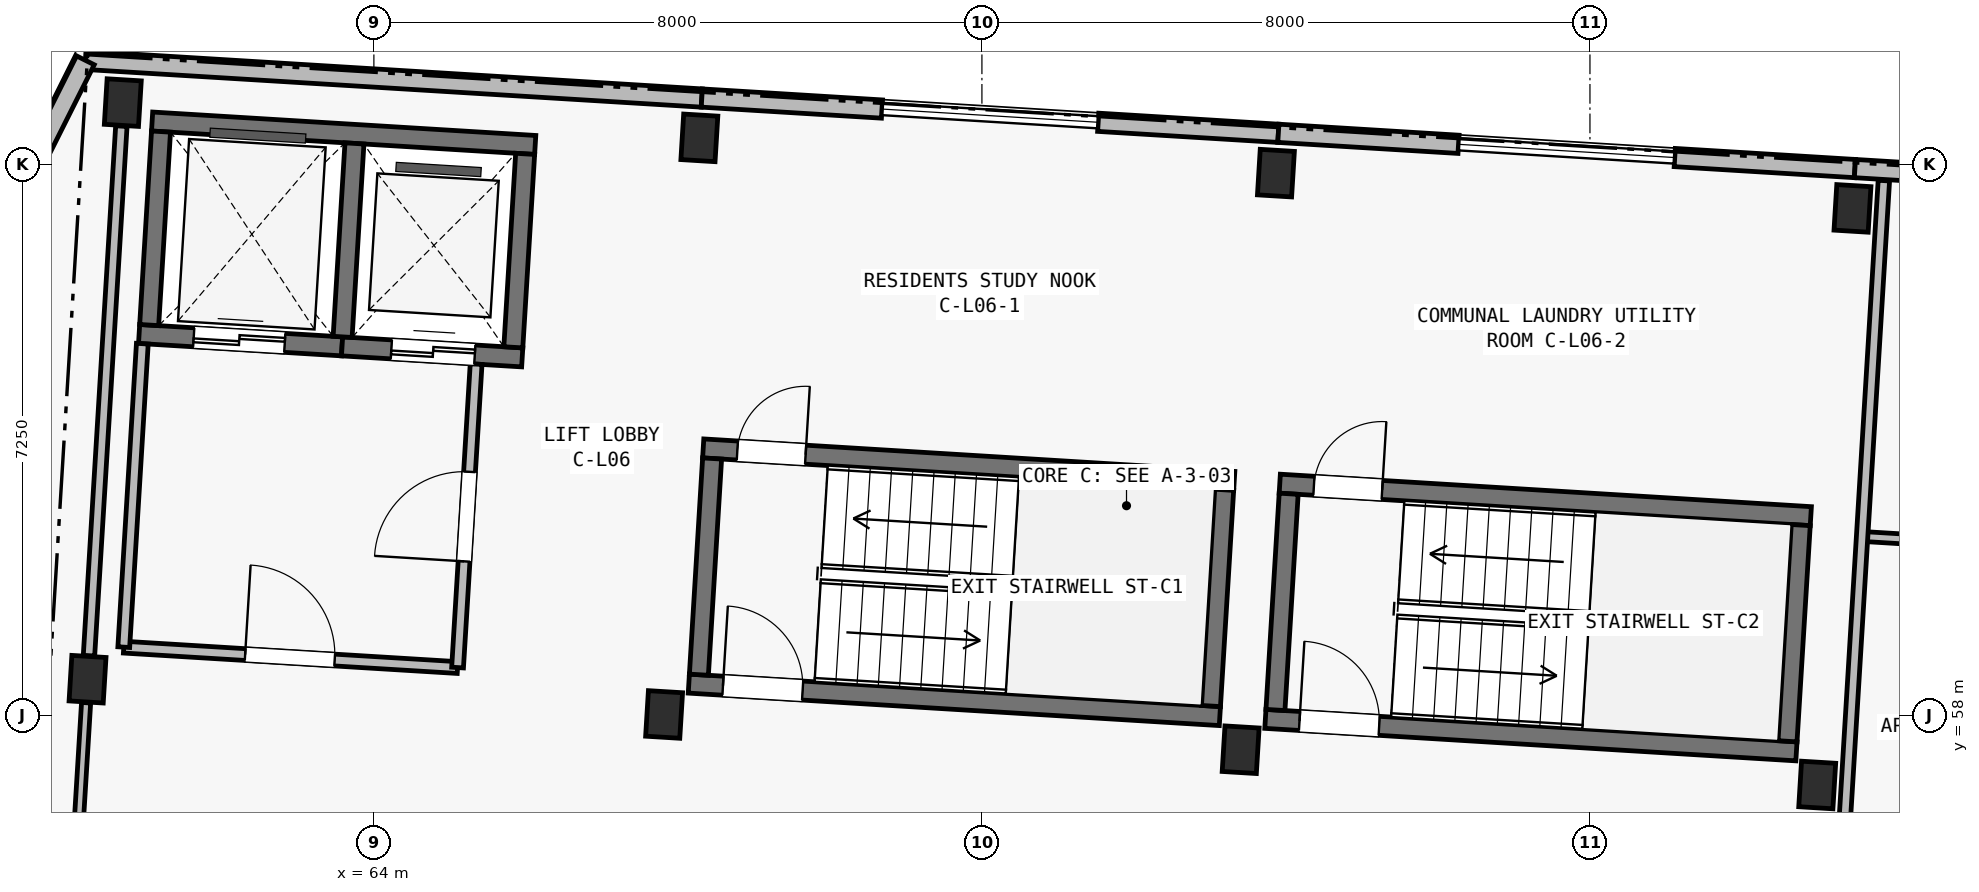
"""IFC4 building model, lengths in metres.
Left out: names, types, materials, properties, quantities, classifications, styles, units other than length and angle.
Written with IfcOpenShell. Run it as: python <this file> out.ifc"""

import sys

from ifc_helpers import new_model, si_unit, direction, frame, frame_2d, origin, origin_2d, place, context, subcontext, project, spatial, rectangle, extrude, element, fill, save


model = new_model("IFC4")
c1 = context("Model", 3, precision=1e-05, world=origin(), true_north=direction((0.0, 1.0)))
c2 = subcontext(c1, "Body", "Model", "MODEL_VIEW")
j1 = project(units=[si_unit("LENGTHUNIT", "METRE"), si_unit("PLANEANGLEUNIT", "RADIAN")], contexts=[c1])
p1 = place(None, origin())
s1 = spatial("IfcSite", under=j1, at=p1, CompositionType="ELEMENT")
p2 = place(p1, origin())
s2 = spatial("IfcBuilding", under=s1, at=p2, CompositionType="ELEMENT")
p3 = place(p2, frame((0.0, 0.0, 21.4)))
s3 = spatial("IfcBuildingStorey", under=s2, at=p3, CompositionType="ELEMENT", Elevation=21.4)
for number, where, z_axis, x_axis in (
    (1, (60.233, 58.478, 0.0), (0.0, 0.0, 1.0), (0.998, -0.061, 0.0)),
    (2, (60.697, 66.063, 0.0), (0.0, 0.0, 1.0), (0.998, -0.061, 0.0)),
    (3, (67.818, 58.014, 0.0), (0.0, 0.0, 1.0), (0.998, -0.061, 0.0)),
    (4, (68.282, 65.599, 0.0), (0.0, 0.0, 1.0), (0.998, -0.061, 0.0)),
    (5, (75.404, 57.55, 0.0), (0.0, 0.0, 1.0), (0.998, -0.061, 0.0)),
    (6, (75.868, 65.135, 0.0), (0.0, 0.0, 1.0), (0.998, -0.061, 0.0)),
    (7, (82.99, 57.086, 0.0), (0.0, 0.0, 1.0), (0.998, -0.061, 0.0)),
    (8, (83.454, 64.672, 0.0), (0.0, 0.0, 1.0), (0.998, -0.061, 0.0)),
):
    element("IfcColumn", number, at=place(p3, frame(where, z_axis=z_axis, x_axis=x_axis)), inside=s3, PredefinedType="COLUMN", context=c2, shape_type="SweptSolid", body=[
        extrude(rectangle(XDim=0.45, YDim=0.6, at=origin_2d()), origin(), (0.0, 0.0, 1.0), 3.25),
    ])
p4 = place(p3, frame((61.082, 65.814, 0.0), z_axis=(0.0, 0.0, 1.0), x_axis=(0.998134101522, -0.061059932685, 0.0)))
e9 = element("IfcWall", 9, at=p4, inside=s3, PredefinedType="SHEAR", context=c2, shape_type="SweptSolid", body=[
    extrude(rectangle(XDim=5.05, YDim=0.25, at=frame_2d((2.525, 0.0))), origin(), (0.0, 0.0, 1.0), 3.25),
])
p5 = place(p3, frame((60.911, 63.02, 0.0), z_axis=(0.0, 0.0, 1.0), x_axis=(0.998134099905, -0.061059959111, 0.0)))
e10 = element("IfcWall", 10, at=p5, inside=s3, PredefinedType="SHEAR", context=c2, shape_type="SweptSolid", body=[
    extrude(rectangle(XDim=2.675, YDim=0.25, at=frame_2d((1.337, 0.0))), origin(), (0.0, 0.0, 1.0), 3.25),
])
p6 = place(p5, frame((0.72, 0.0, 0.0)))
e11 = element("IfcOpeningElement", 11, at=p6, cuts=e10, PredefinedType="OPENING", context=c2, shape_type="SweptSolid", body=[
    extrude(rectangle(XDim=1.2, YDim=2.2, at=frame_2d((0.6, 1.1))), frame((0.0, 0.14, 0.0), z_axis=(0.0, -1.0, 0.0), x_axis=(1.0, 0.0, 0.0)), (0.0, 0.0, 1.0), 0.28),
])
p7 = place(p3, frame((63.581, 62.856, 0.0), z_axis=(0.0, 0.0, 1.0), x_axis=(0.998134103342, -0.061059902923, 0.0)))
e12 = element("IfcWall", 12, at=p7, inside=s3, PredefinedType="SHEAR", context=c2, shape_type="SweptSolid", body=[
    extrude(rectangle(XDim=2.375, YDim=0.25, at=frame_2d((1.188, 0.0))), origin(), (0.0, 0.0, 1.0), 3.25),
])
p8 = place(p7, frame((0.65, 0.0, 0.0)))
e13 = element("IfcOpeningElement", 13, at=p8, cuts=e12, PredefinedType="OPENING", context=c2, shape_type="SweptSolid", body=[
    extrude(rectangle(XDim=1.1, YDim=2.15, at=frame_2d((0.55, 1.075))), frame((0.0, 0.14, 0.0), z_axis=(0.0, -1.0, 0.0), x_axis=(1.0, 0.0, 0.0)), (0.0, 0.0, 1.0), 0.28),
])
p9 = place(p3, frame((61.043, 63.137, 0.0), z_axis=(0.0, 0.0, 1.0), x_axis=(0.061078919587, 0.998132939834, 0.0)))
e14 = element("IfcWall", 14, at=p9, inside=s3, PredefinedType="SHEAR", context=c2, shape_type="SweptSolid", body=[
    extrude(rectangle(XDim=2.55, YDim=0.25, at=frame_2d((1.275, 0.0))), origin(), (0.0, 0.0, 1.0), 3.25),
])
p10 = place(p3, frame((63.589, 62.981, 0.0), z_axis=(0.0, 0.0, 1.0), x_axis=(0.060989368901, 0.998138415692, 0.0)))
e15 = element("IfcWall", 15, at=p10, inside=s3, PredefinedType="SHEAR", context=c2, shape_type="SweptSolid", body=[
    extrude(rectangle(XDim=2.55, YDim=0.25, at=frame_2d((1.275, 0.0))), origin(), (0.0, 0.0, 1.0), 3.25),
])
p11 = place(p3, frame((65.834, 62.844, 0.0), z_axis=(0.0, 0.0, 1.0), x_axis=(0.061084756616, 0.998132582631, 0.0)))
e16 = element("IfcWall", 16, at=p11, inside=s3, PredefinedType="SHEAR", context=c2, shape_type="SweptSolid", body=[
    extrude(rectangle(XDim=2.55, YDim=0.25, at=frame_2d((1.275, 0.0))), origin(), (0.0, 0.0, 1.0), 3.25),
])
p12 = place(p3, frame((68.333, 61.514, 0.0), z_axis=(0.0, 0.0, 1.0), x_axis=(0.998135676081, -0.061034188237, 0.0)))
e17 = element("IfcWall", 17, at=p12, inside=s3, PredefinedType="SHEAR", context=c2, shape_type="SweptSolid", body=[
    extrude(rectangle(XDim=7.0, YDim=0.25, at=frame_2d((3.5, 0.0))), origin(), (0.0, 0.0, 1.0), 3.25),
])
p13 = place(p12, frame((0.45, 0.0, 0.0)))
e18 = element("IfcOpeningElement", 18, at=p13, cuts=e17, PredefinedType="OPENING", context=c2, shape_type="SweptSolid", body=[
    extrude(rectangle(XDim=0.9, YDim=2.1, at=frame_2d((0.45, 1.05))), frame((0.0, 0.14, 0.0), z_axis=(0.0, -1.0, 0.0), x_axis=(1.0, 0.0, 0.0)), (0.0, 0.0, 1.0), 0.28),
])
p14 = place(p3, frame((68.144, 58.419, 0.0), z_axis=(0.0, 0.0, 1.0), x_axis=(0.998135546153, -0.061036313012, 0.0)))
e19 = element("IfcWall", 19, at=p14, inside=s3, PredefinedType="SHEAR", context=c2, shape_type="SweptSolid", body=[
    extrude(rectangle(XDim=7.0, YDim=0.25, at=frame_2d((3.5, 0.0))), origin(), (0.0, 0.0, 1.0), 3.25),
])
p15 = place(p14, frame((0.45, 0.0, 0.0)))
e20 = element("IfcOpeningElement", 20, at=p15, cuts=e19, PredefinedType="OPENING", context=c2, shape_type="SweptSolid", body=[
    extrude(rectangle(XDim=1.05, YDim=2.15, at=frame_2d((0.525, 1.075))), frame((0.0, 0.14, 0.0), z_axis=(0.0, -1.0, 0.0), x_axis=(1.0, 0.0, 0.0)), (0.0, 0.0, 1.0), 0.28),
])
for number, where, z_axis, x_axis in (
    (21, (68.276, 58.537, 0.0), (0.0, 0.0, 1.0), (0.061, 0.998, 0.0)),
    (22, (75.014, 58.125, 0.0), (0.0, 0.0, 1.0), (0.061, 0.998, 0.0)),
):
    element("IfcWall", number, at=place(p3, frame(where, z_axis=z_axis, x_axis=x_axis)), inside=s3, PredefinedType="SHEAR", context=c2, shape_type="SweptSolid", body=[
        extrude(rectangle(XDim=2.85, YDim=0.25, at=frame_2d((1.425, 0.0))), origin(), (0.0, 0.0, 1.0), 3.25),
    ])
p16 = place(p3, frame((75.919, 61.05, 0.0), z_axis=(0.0, 0.0, 1.0), x_axis=(0.998135546153, -0.061036313012, 0.0)))
e23 = element("IfcWall", 23, at=p16, inside=s3, PredefinedType="SHEAR", context=c2, shape_type="SweptSolid", body=[
    extrude(rectangle(XDim=7.0, YDim=0.25, at=frame_2d((3.5, 0.0))), origin(), (0.0, 0.0, 1.0), 3.25),
])
p17 = place(p16, frame((0.45, 0.0, 0.0)))
e24 = element("IfcOpeningElement", 24, at=p17, cuts=e23, PredefinedType="OPENING", context=c2, shape_type="SweptSolid", body=[
    extrude(rectangle(XDim=0.9, YDim=2.1, at=frame_2d((0.45, 1.05))), frame((0.0, 0.14, 0.0), z_axis=(0.0, -1.0, 0.0), x_axis=(1.0, 0.0, 0.0)), (0.0, 0.0, 1.0), 0.28),
])
p18 = place(p3, frame((75.73, 57.956, 0.0), z_axis=(0.0, 0.0, 1.0), x_axis=(0.998135546153, -0.061036313012, 0.0)))
e25 = element("IfcWall", 25, at=p18, inside=s3, PredefinedType="SHEAR", context=c2, shape_type="SweptSolid", body=[
    extrude(rectangle(XDim=7.0, YDim=0.25, at=frame_2d((3.5, 0.0))), origin(), (0.0, 0.0, 1.0), 3.25),
])
p19 = place(p18, frame((0.45, 0.0, 0.0)))
e26 = element("IfcOpeningElement", 26, at=p19, cuts=e25, PredefinedType="OPENING", context=c2, shape_type="SweptSolid", body=[
    extrude(rectangle(XDim=1.05, YDim=2.15, at=frame_2d((0.525, 1.075))), frame((0.0, 0.14, 0.0), z_axis=(0.0, -1.0, 0.0), x_axis=(1.0, 0.0, 0.0)), (0.0, 0.0, 1.0), 0.28),
])
for number, where, z_axis, x_axis in (
    (27, (75.862, 58.073, 0.0), (0.0, 0.0, 1.0), (0.061, 0.998, 0.0)),
    (28, (82.599, 57.661, 0.0), (0.0, 0.0, 1.0), (0.061, 0.998, 0.0)),
):
    element("IfcWall", number, at=place(p3, frame(where, z_axis=z_axis, x_axis=x_axis)), inside=s3, PredefinedType="SHEAR", context=c2, shape_type="SweptSolid", body=[
        extrude(rectangle(XDim=2.85, YDim=0.25, at=frame_2d((1.425, 0.0))), origin(), (0.0, 0.0, 1.0), 3.25),
    ])
p20 = place(p3, frame((60.205, 66.62, 0.0), z_axis=(0.0, 0.0, 1.0), x_axis=(0.998134248939, -0.061057522844, 0.0)))
e29 = element("IfcWall", 29, at=p20, inside=s3, PredefinedType="SOLIDWALL", context=c2, shape_type="SweptSolid", body=[
    extrude(rectangle(XDim=8.125, YDim=0.24, at=frame_2d((4.062, 0.0))), origin(), (0.0, 0.0, 1.0), 3.0),
])
p21 = place(p3, frame((68.314, 66.124, 0.0), z_axis=(0.0, 0.0, 1.0), x_axis=(0.998134103342, -0.061059902923, 0.0)))
e30 = element("IfcWall", 30, at=p21, inside=s3, PredefinedType="SOLIDWALL", context=c2, shape_type="SweptSolid", body=[
    extrude(rectangle(XDim=2.375, YDim=0.24, at=frame_2d((1.188, 0.0))), origin(), (0.0, 0.0, 1.0), 3.0),
])
p22 = place(p3, frame((73.53, 65.804, 0.0), z_axis=(0.0, 0.0, 1.0), x_axis=(0.998133720034, -0.061066168473, 0.0)))
e31 = element("IfcWall", 31, at=p22, inside=s3, PredefinedType="SOLIDWALL", context=c2, shape_type="SweptSolid", body=[
    extrude(rectangle(XDim=2.375, YDim=0.24, at=frame_2d((1.188, 0.0))), origin(), (0.0, 0.0, 1.0), 3.0),
])
for number, where, z_axis, x_axis in (
    (32, (75.9, 65.659, 0.0), (0.0, 0.0, 1.0), (0.998, -0.061, 0.0)),
    (33, (81.115, 65.341, 0.0), (0.0, 0.0, 1.0), (0.998, -0.061, 0.0)),
):
    element("IfcWall", number, at=place(p3, frame(where, z_axis=z_axis, x_axis=x_axis)), inside=s3, PredefinedType="SOLIDWALL", context=c2, shape_type="SweptSolid", body=[
        extrude(rectangle(XDim=2.375, YDim=0.24, at=frame_2d((1.188, 0.0))), origin(), (0.0, 0.0, 1.0), 3.0),
    ])
p23 = place(p3, frame((83.486, 65.196, 0.0), z_axis=(0.0, 0.0, 1.0), x_axis=(0.998135669243, -0.061034300063, 0.0)))
e34 = element("IfcWall", 34, at=p23, inside=s3, PredefinedType="SOLIDWALL", context=c2, shape_type="SweptSolid", body=[
    extrude(rectangle(XDim=7.6, YDim=0.24, at=frame_2d((3.8, 0.0))), origin(), (0.0, 0.0, 1.0), 3.0),
])
p24 = place(p23, frame((0.89, 0.0, 0.5)))
e35 = element("IfcOpeningElement", 35, at=p24, cuts=e34, PredefinedType="OPENING", context=c2, shape_type="SweptSolid", body=[
    extrude(rectangle(XDim=0.84, YDim=2.28, at=frame_2d((0.42, 1.14))), frame((0.0, 0.135, 0.0), z_axis=(0.0, -1.0, 0.0), x_axis=(1.0, 0.0, 0.0)), (0.0, 0.0, 1.0), 0.27),
])
p25 = place(p23, frame((5.546, 0.0, 0.44)))
e36 = element("IfcOpeningElement", 36, at=p25, cuts=e34, PredefinedType="OPENING", context=c2, shape_type="SweptSolid", body=[
    extrude(rectangle(XDim=0.62, YDim=2.28, at=frame_2d((0.31, 1.14))), frame((0.0, 0.135, 0.0), z_axis=(0.0, -1.0, 0.0), x_axis=(1.0, 0.0, 0.0)), (0.0, 0.0, 1.0), 0.27),
])
p26 = place(p3, frame((51.654, 49.585, 0.0), z_axis=(0.0, 0.0, 1.0), x_axis=(0.448621989068, 0.893721607059, 0.0)))
e37 = element("IfcWall", 37, at=p26, inside=s3, PredefinedType="SOLIDWALL", context=c2, shape_type="SweptSolid", body=[
    extrude(rectangle(XDim=19.061, YDim=0.26, at=frame_2d((9.53, 0.0))), origin(), (0.0, 0.0, 1.0), 3.0),
])
p27 = place(p26, frame((2.81, 0.0, 0.45)))
e38 = element("IfcOpeningElement", 38, at=p27, cuts=e37, PredefinedType="OPENING", context=c2, shape_type="SweptSolid", body=[
    extrude(rectangle(XDim=0.58, YDim=2.16, at=frame_2d((0.29, 1.08))), frame((0.0, 0.145, 0.0), z_axis=(0.0, -1.0, 0.0), x_axis=(1.0, 0.0, 0.0)), (0.0, 0.0, 1.0), 0.29),
])
p28 = place(p26, frame((15.531, 0.0, 0.52)))
e39 = element("IfcOpeningElement", 39, at=p28, cuts=e37, PredefinedType="OPENING", context=c2, shape_type="SweptSolid", body=[
    extrude(rectangle(XDim=0.72, YDim=2.16, at=frame_2d((0.36, 1.08))), frame((0.0, 0.145, 0.0), z_axis=(0.0, -1.0, 0.0), x_axis=(1.0, 0.0, 0.0)), (0.0, 0.0, 1.0), 0.29),
])
p29 = place(p3, frame((60.709, 58.899, 0.0), z_axis=(0.0, 0.0, 1.0), x_axis=(0.998132276607, -0.061089756882, 0.0)))
e40 = element("IfcWall", 40, at=p29, inside=s3, PredefinedType="PARTITIONING", context=c2, shape_type="SweptSolid", body=[
    extrude(rectangle(XDim=4.4, YDim=0.155, at=frame_2d((2.2, 0.0))), origin(), (0.0, 0.0, 1.0), 2.97),
])
p30 = place(p29, frame((1.6, 0.0, 0.0)))
e41 = element("IfcOpeningElement", 41, at=p30, cuts=e40, PredefinedType="OPENING", context=c2, shape_type="SweptSolid", body=[
    extrude(rectangle(XDim=1.18, YDim=2.15, at=frame_2d((0.59, 1.075))), frame((0.0, 0.093, 0.0), z_axis=(0.0, -1.0, 0.0), x_axis=(1.0, 0.0, 0.0)), (0.0, 0.0, 1.0), 0.185),
])
p31 = place(p3, frame((60.709, 58.899, 0.0), z_axis=(0.0, 0.0, 1.0), x_axis=(0.061036844229, 0.998135513669, 0.0)))
e42 = element("IfcWall", 42, at=p31, inside=s3, PredefinedType="PARTITIONING", context=c2, shape_type="SweptSolid", body=[
    extrude(rectangle(XDim=4.0, YDim=0.155, at=frame_2d((2.0, 0.0))), origin(), (0.0, 0.0, 1.0), 2.97),
])
p32 = place(p3, frame((65.101, 58.631, 0.0), z_axis=(0.0, 0.0, 1.0), x_axis=(0.061033125904, 0.99813574104, 0.0)))
e43 = element("IfcWall", 43, at=p32, inside=s3, PredefinedType="PARTITIONING", context=c2, shape_type="SweptSolid", body=[
    extrude(rectangle(XDim=4.0, YDim=0.155, at=frame_2d((2.0, 0.0))), origin(), (0.0, 0.0, 1.0), 2.97),
])
p33 = place(p32, frame((1.4, 0.0, 0.0)))
e44 = element("IfcOpeningElement", 44, at=p33, cuts=e43, PredefinedType="OPENING", context=c2, shape_type="SweptSolid", body=[
    extrude(rectangle(XDim=1.18, YDim=2.15, at=frame_2d((0.59, 1.075))), frame((0.0, 0.093, 0.0), z_axis=(0.0, -1.0, 0.0), x_axis=(1.0, 0.0, 0.0)), (0.0, 0.0, 1.0), 0.185),
])
p34 = place(p3, frame((59.983, 54.395, 0.0), z_axis=(0.0, 0.0, 1.0), x_axis=(0.061035211258, 0.998135613525, 0.0)))
e45 = element("IfcWall", 45, at=p34, inside=s3, PredefinedType="PARTITIONING", context=c2, shape_type="SweptSolid", body=[
    extrude(rectangle(XDim=3.78, YDim=0.12, at=frame_2d((1.89, 0.0))), origin(), (0.0, 0.0, 1.0), 2.5),
])
p35 = place(p34, frame((1.35, 0.0, 0.0)))
e46 = element("IfcOpeningElement", 46, at=p35, cuts=e45, PredefinedType="OPENING", context=c2, shape_type="SweptSolid", body=[
    extrude(rectangle(XDim=0.9, YDim=2.1, at=frame_2d((0.45, 1.05))), frame((0.0, 0.075, 0.0), z_axis=(0.0, -1.0, 0.0), x_axis=(1.0, 0.0, 0.0)), (0.0, 0.0, 1.0), 0.15),
])
p36 = place(p3, frame((60.251, 58.787, 0.0), z_axis=(0.0, 0.0, 1.0), x_axis=(0.061071659957, 0.998133384047, 0.0)))
e47 = element("IfcWall", 47, at=p36, inside=s3, PredefinedType="PARTITIONING", context=c2, shape_type="SweptSolid", body=[
    extrude(rectangle(XDim=6.98, YDim=0.15, at=frame_2d((3.49, 0.0))), origin(), (0.0, 0.0, 1.0), 2.5),
])
p37 = place(p3, frame((83.581, 60.356, 0.0), z_axis=(0.0, 0.0, 1.0), x_axis=(0.998133350094, -0.061072214879, 0.0)))
e48 = element("IfcWall", 48, at=p37, inside=s3, PredefinedType="PARTITIONING", context=c2, shape_type="SweptSolid", body=[
    extrude(rectangle(XDim=3.41, YDim=0.13, at=frame_2d((1.705, 0.0))), origin(), (0.0, 0.0, 1.0), 2.97),
])
p38 = place(p37, frame((1.255, 0.0, 0.0)))
e49 = element("IfcOpeningElement", 49, at=p38, cuts=e48, PredefinedType="OPENING", context=c2, shape_type="SweptSolid", body=[
    extrude(rectangle(XDim=0.88, YDim=2.1, at=frame_2d((0.44, 1.05))), frame((0.0, 0.08, 0.0), z_axis=(0.0, -1.0, 0.0), x_axis=(1.0, 0.0, 0.0)), (0.0, 0.0, 1.0), 0.16),
])
p39 = place(p3, frame((83.265, 55.185, 0.0), z_axis=(0.0, 0.0, 1.0), x_axis=(0.061046193261, 0.998134941923, 0.0)))
e50 = element("IfcWall", 50, at=p39, inside=s3, PredefinedType="PARTITIONING", context=c2, shape_type="SweptSolid", body=[
    extrude(rectangle(XDim=9.87, YDim=0.15, at=frame_2d((4.935, 0.0))), origin(), (0.0, 0.0, 1.0), 2.97),
])
p40 = place(p30, origin())
e51 = element("IfcDoor", 51, at=p40, inside=s3, OperationType="SINGLE_SWING_LEFT", PredefinedType="DOOR", context=c2, shape_type="SweptSolid", body=[
    extrude(rectangle(XDim=1.18, YDim=2.15, at=frame_2d((0.59, 1.075))), frame((0.0, 0.025, 0.0), z_axis=(0.0, -1.0, 0.0), x_axis=(1.0, 0.0, 0.0)), (0.0, 0.0, 1.0), 0.05),
])
fill(e41, e51)
p41 = place(p33, origin())
e52 = element("IfcDoor", 52, at=p41, inside=s3, OperationType="SINGLE_SWING_LEFT", PredefinedType="DOOR", context=c2, shape_type="SweptSolid", body=[
    extrude(rectangle(XDim=1.18, YDim=2.15, at=frame_2d((0.59, 1.075))), frame((0.0, 0.025, 0.0), z_axis=(0.0, -1.0, 0.0), x_axis=(1.0, 0.0, 0.0)), (0.0, 0.0, 1.0), 0.05),
])
fill(e44, e52)
p42 = place(p15, origin())
e53 = element("IfcDoor", 53, at=p42, inside=s3, OperationType="SINGLE_SWING_LEFT", PredefinedType="DOOR", context=c2, shape_type="SweptSolid", body=[
    extrude(rectangle(XDim=1.05, YDim=2.15, at=frame_2d((0.525, 1.075))), frame((0.0, 0.025, 0.0), z_axis=(0.0, -1.0, 0.0), x_axis=(1.0, 0.0, 0.0)), (0.0, 0.0, 1.0), 0.05),
])
fill(e20, e53)
p43 = place(p13, origin())
e54 = element("IfcDoor", 54, at=p43, inside=s3, OperationType="SINGLE_SWING_RIGHT", PredefinedType="DOOR", context=c2, shape_type="SweptSolid", body=[
    extrude(rectangle(XDim=0.9, YDim=2.1, at=frame_2d((0.45, 1.05))), frame((0.0, 0.025, 0.0), z_axis=(0.0, -1.0, 0.0), x_axis=(1.0, 0.0, 0.0)), (0.0, 0.0, 1.0), 0.05),
])
fill(e18, e54)
p44 = place(p19, origin())
e55 = element("IfcDoor", 55, at=p44, inside=s3, OperationType="SINGLE_SWING_LEFT", PredefinedType="DOOR", context=c2, shape_type="SweptSolid", body=[
    extrude(rectangle(XDim=1.05, YDim=2.15, at=frame_2d((0.525, 1.075))), frame((0.0, 0.025, 0.0), z_axis=(0.0, -1.0, 0.0), x_axis=(1.0, 0.0, 0.0)), (0.0, 0.0, 1.0), 0.05),
])
fill(e26, e55)
p45 = place(p17, origin())
e56 = element("IfcDoor", 56, at=p45, inside=s3, OperationType="SINGLE_SWING_RIGHT", PredefinedType="DOOR", context=c2, shape_type="SweptSolid", body=[
    extrude(rectangle(XDim=0.9, YDim=2.1, at=frame_2d((0.45, 1.05))), frame((0.0, 0.025, 0.0), z_axis=(0.0, -1.0, 0.0), x_axis=(1.0, 0.0, 0.0)), (0.0, 0.0, 1.0), 0.05),
])
fill(e24, e56)
p46 = place(p6, origin())
e57 = element("IfcDoor", 57, at=p46, inside=s3, OperationType="DOUBLE_DOOR_SLIDING", PredefinedType="DOOR", context=c2, shape_type="SweptSolid", body=[
    extrude(rectangle(XDim=1.2, YDim=2.2, at=frame_2d((0.6, 1.1))), frame((0.0, 0.025, 0.0), z_axis=(0.0, -1.0, 0.0), x_axis=(1.0, 0.0, 0.0)), (0.0, 0.0, 1.0), 0.05),
])
fill(e11, e57)
p47 = place(p8, origin())
e58 = element("IfcDoor", 58, at=p47, inside=s3, OperationType="DOUBLE_DOOR_SLIDING", PredefinedType="DOOR", context=c2, shape_type="SweptSolid", body=[
    extrude(rectangle(XDim=1.1, YDim=2.15, at=frame_2d((0.55, 1.075))), frame((0.0, 0.025, 0.0), z_axis=(0.0, -1.0, 0.0), x_axis=(1.0, 0.0, 0.0)), (0.0, 0.0, 1.0), 0.05),
])
fill(e13, e58)
save(model, sys.argv[1])
